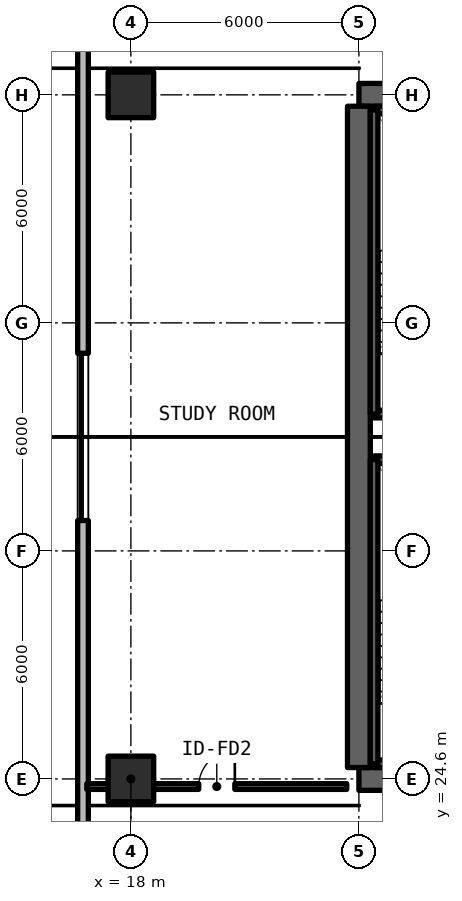
"""IFC4 building model, lengths in metres.
Left out: names, types, materials, properties, quantities, classifications, styles, units other than length and angle.
Written with IfcOpenShell. Run it as: python <this file> out.ifc"""

import sys

from ifc_helpers import new_model, si_unit, direction, frame, frame_2d, origin, origin_2d, place, context, subcontext, project, spatial, rectangle, extrude, element, fill, save


model = new_model("IFC4")
c1 = context("Model", 3, precision=1e-05, world=origin(), true_north=direction((0.0, 1.0)))
c2 = subcontext(c1, "Body", "Model", "MODEL_VIEW")
j1 = project(units=[si_unit("LENGTHUNIT", "METRE"), si_unit("PLANEANGLEUNIT", "RADIAN")], contexts=[c1])
p1 = place(None, origin())
s1 = spatial("IfcSite", under=j1, at=p1, CompositionType="ELEMENT")
p2 = place(p1, origin())
s2 = spatial("IfcBuilding", under=s1, at=p2, CompositionType="ELEMENT")
p3 = place(p2, frame((0.0, 0.0, 45.54)))
s3 = spatial("IfcBuildingStorey", under=s2, at=p3, CompositionType="ELEMENT", Elevation=45.54)
for number, where, z_axis, x_axis in (
    (1, (24.0, 24.6, 0.0), (0.0, 0.0, 1.0), (1.0, 0.0, 0.0)),
    (2, (36.0, 42.6, 0.0), (0.0, 0.0, 1.0), (-1.0, 0.0, 0.0)),
):
    element("IfcWall", number, at=place(p3, frame(where, z_axis=z_axis, x_axis=x_axis)), inside=s3, PredefinedType="SHEAR", context=c2, shape_type="SweptSolid", body=[
        extrude(rectangle(XDim=12.0, YDim=0.6, at=frame_2d((6.0, 0.0))), origin(), (0.0, 0.0, 1.0), 3.3),
    ])
p4 = place(p3, frame((24.0, 24.9, 0.0), z_axis=(0.0, 0.0, 1.0), x_axis=(0.0, 1.0, 0.0)))
e3 = element("IfcWall", 3, at=p4, inside=s3, PredefinedType="SHEAR", context=c2, shape_type="SweptSolid", body=[
    extrude(rectangle(XDim=17.4, YDim=0.6, at=frame_2d((8.7, 0.0))), origin(), (0.0, 0.0, 1.0), 3.3),
])
for number, where, z_axis, x_axis in (
    (4, (18.0, 24.6, 0.0), (0.0, 0.0, 1.0), (1.0, 0.0, 0.0)),
    (5, (18.0, 42.6, 0.0), (0.0, 0.0, 1.0), (1.0, 0.0, 0.0)),
):
    element("IfcColumn", number, at=place(p3, frame(where, z_axis=z_axis, x_axis=x_axis)), inside=s3, PredefinedType="COLUMN", context=c2, shape_type="SweptSolid", body=[
        extrude(rectangle(XDim=1.2, YDim=1.2, at=origin_2d()), origin(), (0.0, 0.0, 1.0), 3.3),
    ])
p5 = place(p3, frame((16.74, 55.342, 0.0), z_axis=(0.0, 0.0, 1.0), x_axis=(0.0, -1.0, 0.0)))
e6 = element("IfcWall", 6, at=p5, inside=s3, PredefinedType="SOLIDWALL", context=c2, shape_type="SweptSolid", body=[
    extrude(rectangle(XDim=43.484, YDim=0.28, at=frame_2d((21.742, 0.0))), origin(), (0.0, 0.0, 1.0), 3.08),
])
p6 = place(p5, frame((38.942, 0.0, 0.0)))
e7 = element("IfcOpeningElement", 7, at=p6, cuts=e6, PredefinedType="OPENING", context=c2, shape_type="SweptSolid", body=[
    extrude(rectangle(XDim=1.1, YDim=2.15, at=frame_2d((0.55, 1.075))), frame((0.0, 0.15, 0.0), z_axis=(0.0, -1.0, 0.0), x_axis=(1.0, 0.0, 0.0)), (0.0, 0.0, 1.0), 0.3),
])
p7 = place(p5, frame((3.442, 0.0, 0.0)))
e8 = element("IfcOpeningElement", 8, at=p7, cuts=e6, PredefinedType="OPENING", context=c2, shape_type="SweptSolid", body=[
    extrude(rectangle(XDim=1.1, YDim=2.15, at=frame_2d((0.55, 1.075))), frame((0.0, 0.15, 0.0), z_axis=(0.0, -1.0, 0.0), x_axis=(1.0, 0.0, 0.0)), (0.0, 0.0, 1.0), 0.3),
])
p8 = place(p5, frame((19.542, 0.0, 0.78)))
e9 = element("IfcOpeningElement", 9, at=p8, cuts=e6, PredefinedType="OPENING", context=c2, shape_type="SweptSolid", body=[
    extrude(rectangle(XDim=4.4, YDim=1.66, at=frame_2d((2.2, 0.83))), frame((0.0, 0.15, 0.0), z_axis=(0.0, -1.0, 0.0), x_axis=(1.0, 0.0, 0.0)), (0.0, 0.0, 1.0), 0.3),
])
p9 = place(p3, frame((16.84, 24.4, 0.0), z_axis=(0.0, 0.0, 1.0), x_axis=(1.0, 0.0, 0.0)))
e10 = element("IfcWall", 10, at=p9, inside=s3, PredefinedType="SOLIDWALL", context=c2, shape_type="SweptSolid", body=[
    extrude(rectangle(XDim=6.84, YDim=0.15, at=frame_2d((3.42, 0.0))), origin(), (0.0, 0.0, 1.0), 2.295),
])
p10 = place(p9, frame((2.945, 0.0, 0.0)))
e11 = element("IfcOpeningElement", 11, at=p10, cuts=e10, PredefinedType="OPENING", context=c2, shape_type="SweptSolid", body=[
    extrude(rectangle(XDim=0.95, YDim=2.15, at=frame_2d((0.475, 1.075))), frame((0.0, 0.085, 0.0), z_axis=(0.0, -1.0, 0.0), x_axis=(1.0, 0.0, 0.0)), (0.0, 0.0, 1.0), 0.17),
])
for number, where, z_axis, x_axis in (
    (12, (24.4, 25.0, 0.0), (0.0, 0.0, 1.0), (1.0, 0.0, 0.0)),
    (13, (27.8, 33.0, 0.0), (0.0, 0.0, 1.0), (-1.0, 0.0, 0.0)),
):
    element("IfcWall", number, at=place(p3, frame(where, z_axis=z_axis, x_axis=x_axis)), inside=s3, PredefinedType="SOLIDWALL", context=c2, shape_type="SweptSolid", body=[
        extrude(rectangle(XDim=3.4, YDim=0.2, at=frame_2d((1.7, 0.0))), origin(), (0.0, 0.0, 1.0), 3.3),
    ])
p11 = place(p3, frame((24.4, 33.0, 0.0), z_axis=(0.0, 0.0, 1.0), x_axis=(0.0, -1.0, 0.0)))
e14 = element("IfcWall", 14, at=p11, inside=s3, PredefinedType="SOLIDWALL", context=c2, shape_type="SweptSolid", body=[
    extrude(rectangle(XDim=8.0, YDim=0.2, at=frame_2d((4.0, 0.0))), origin(), (0.0, 0.0, 1.0), 3.3),
])
for number, where, z_axis, x_axis in (
    (15, (24.4, 34.2, 0.0), (0.0, 0.0, 1.0), (1.0, 0.0, 0.0)),
    (16, (27.8, 42.2, 0.0), (0.0, 0.0, 1.0), (-1.0, 0.0, 0.0)),
):
    element("IfcWall", number, at=place(p3, frame(where, z_axis=z_axis, x_axis=x_axis)), inside=s3, PredefinedType="SOLIDWALL", context=c2, shape_type="SweptSolid", body=[
        extrude(rectangle(XDim=3.4, YDim=0.2, at=frame_2d((1.7, 0.0))), origin(), (0.0, 0.0, 1.0), 3.3),
    ])
p12 = place(p3, frame((24.4, 42.2, 0.0), z_axis=(0.0, 0.0, 1.0), x_axis=(0.0, -1.0, 0.0)))
e17 = element("IfcWall", 17, at=p12, inside=s3, PredefinedType="SOLIDWALL", context=c2, shape_type="SweptSolid", body=[
    extrude(rectangle(XDim=8.0, YDim=0.2, at=frame_2d((4.0, 0.0))), origin(), (0.0, 0.0, 1.0), 3.3),
])
p13 = place(p8, origin())
e18 = element("IfcWindow", 18, at=p13, inside=s3, PartitioningType="SINGLE_PANEL", PredefinedType="WINDOW", context=c2, shape_type="SweptSolid", body=[
    extrude(rectangle(XDim=4.4, YDim=1.66, at=frame_2d((2.2, 0.83))), frame((0.0, 0.03, 0.0), z_axis=(0.0, -1.0, 0.0), x_axis=(1.0, 0.0, 0.0)), (0.0, 0.0, 1.0), 0.06),
])
fill(e9, e18)
p14 = place(p10, origin())
e19 = element("IfcDoor", 19, at=p14, inside=s3, OperationType="SINGLE_SWING_RIGHT", PredefinedType="DOOR", context=c2, shape_type="SweptSolid", body=[
    extrude(rectangle(XDim=0.95, YDim=2.15, at=frame_2d((0.475, 1.075))), frame((0.0, 0.025, 0.0), z_axis=(0.0, -1.0, 0.0), x_axis=(1.0, 0.0, 0.0)), (0.0, 0.0, 1.0), 0.05),
])
fill(e11, e19)
save(model, sys.argv[1])
